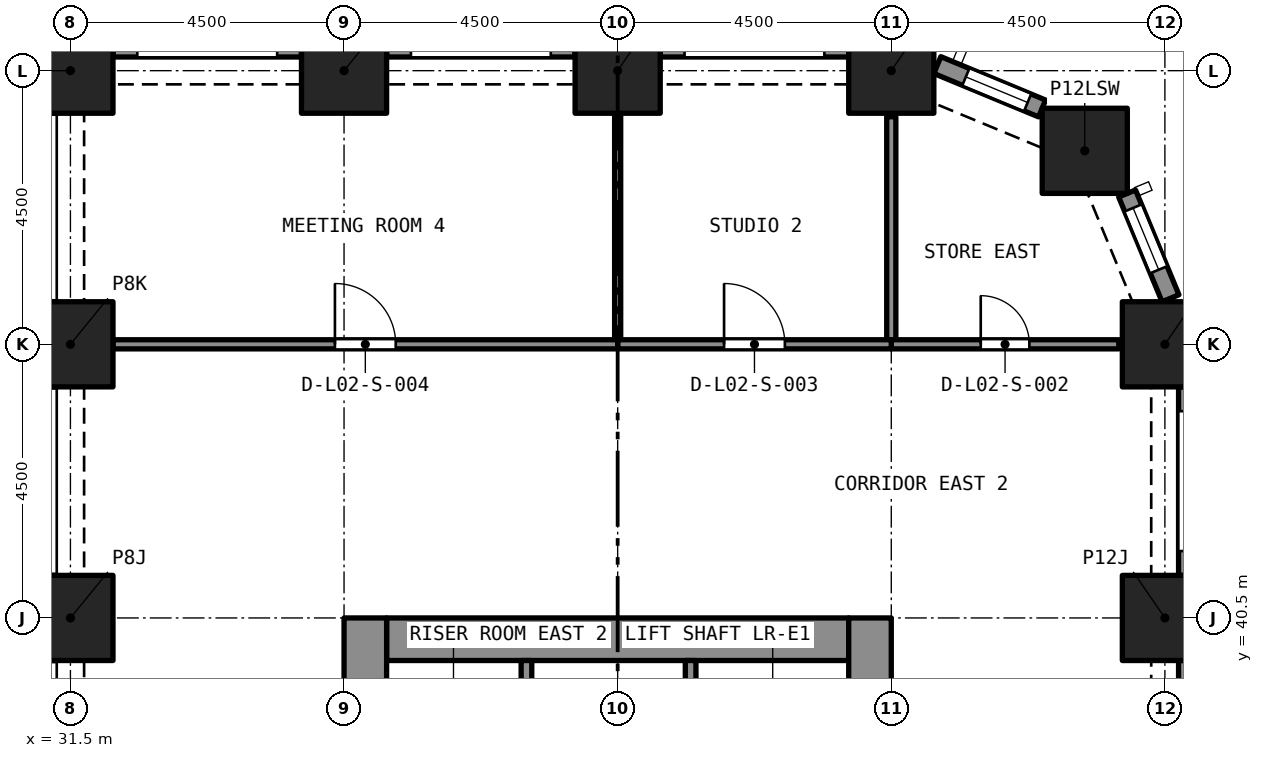
"""IFC4 building model, lengths in metres.
Left out: names, types, materials, properties, quantities, classifications, styles, units other than length and angle.
Written with IfcOpenShell. Run it as: python <this file> out.ifc"""

import sys

from ifc_helpers import new_model, si_unit, direction, frame, frame_2d, origin, origin_2d, place, context, subcontext, project, spatial, rectangle, extrude, element, fill, save


model = new_model("IFC4")
c1 = context("Model", 3, precision=1e-05, world=origin(), true_north=direction((0.0, 1.0)))
c2 = subcontext(c1, "Body", "Model", "MODEL_VIEW")
j1 = project(units=[si_unit("LENGTHUNIT", "METRE"), si_unit("PLANEANGLEUNIT", "RADIAN")], contexts=[c1])
p1 = place(None, origin())
s1 = spatial("IfcSite", under=j1, at=p1, CompositionType="ELEMENT")
p2 = place(p1, origin())
s2 = spatial("IfcBuilding", under=s1, at=p2, CompositionType="ELEMENT")
p3 = place(p2, frame((0.0, 0.0, 11.0)))
s3 = spatial("IfcBuildingStorey", under=s2, at=p3, CompositionType="ELEMENT", Elevation=11.0)
for number, where, z_axis, x_axis in (
    (1, (31.5, 40.5, 0.0), (0.0, 0.0, 1.0), (1.0, 0.0, 0.0)),
    (2, (49.5, 40.5, 0.0), (0.0, 0.0, 1.0), (1.0, 0.0, 0.0)),
    (3, (31.5, 45.0, 0.0), (0.0, 0.0, 1.0), (1.0, 0.0, 0.0)),
    (4, (49.5, 45.0, 0.0), (0.0, 0.0, 1.0), (1.0, 0.0, 0.0)),
    (5, (48.182, 48.182, 0.0), (0.0, 0.0, 1.0), (1.0, 0.0, 0.0)),
    (6, (31.5, 49.5, 0.0), (0.0, 0.0, 1.0), (1.0, 0.0, 0.0)),
    (7, (36.0, 49.5, 0.0), (0.0, 0.0, 1.0), (1.0, 0.0, 0.0)),
    (8, (40.5, 49.5, 0.0), (0.0, 0.0, 1.0), (1.0, 0.0, 0.0)),
    (9, (45.0, 49.5, 0.0), (0.0, 0.0, 1.0), (1.0, 0.0, 0.0)),
):
    element("IfcColumn", number, at=place(p3, frame(where, z_axis=z_axis, x_axis=x_axis)), inside=s3, PredefinedType="COLUMN", context=c2, shape_type="SweptSolid", body=[
        extrude(rectangle(XDim=1.4, YDim=1.4, at=origin_2d()), origin(), (0.0, 0.0, 1.0), 5.0),
    ])
p4 = place(p3, frame((36.7, 40.15, 0.0), z_axis=(0.0, 0.0, 1.0), x_axis=(1.0, 0.0, 0.0)))
e10 = element("IfcWall", 10, at=p4, inside=s3, PredefinedType="SOLIDWALL", context=c2, shape_type="SweptSolid", body=[
    extrude(rectangle(XDim=7.6, YDim=0.7, at=frame_2d((3.8, 0.0))), origin(), (0.0, 0.0, 1.0), 5.0),
])
p5 = place(p3, frame((36.35, 27.0, 0.0), z_axis=(0.0, 0.0, 1.0), x_axis=(0.0, 1.0, 0.0)))
e11 = element("IfcWall", 11, at=p5, inside=s3, PredefinedType="SOLIDWALL", context=c2, shape_type="SweptSolid", body=[
    extrude(rectangle(XDim=13.5, YDim=0.7, at=frame_2d((6.75, 0.0))), origin(), (0.0, 0.0, 1.0), 5.0),
])
p6 = place(p5, frame((8.95, 0.0, 0.0)))
e12 = element("IfcOpeningElement", 12, at=p6, cuts=e11, PredefinedType="OPENING", context=c2, shape_type="SweptSolid", body=[
    extrude(rectangle(XDim=1.2, YDim=2.1, at=frame_2d((0.6, 1.05))), frame((0.0, 0.36, 0.0), z_axis=(0.0, -1.0, 0.0), x_axis=(1.0, 0.0, 0.0)), (0.0, 0.0, 1.0), 0.72),
])
p7 = place(p3, frame((44.65, 27.0, 0.0), z_axis=(0.0, 0.0, 1.0), x_axis=(0.0, 1.0, 0.0)))
e13 = element("IfcWall", 13, at=p7, inside=s3, PredefinedType="SOLIDWALL", context=c2, shape_type="SweptSolid", body=[
    extrude(rectangle(XDim=13.5, YDim=0.7, at=frame_2d((6.75, 0.0))), origin(), (0.0, 0.0, 1.0), 5.0),
])
p8 = place(p7, frame((8.95, 0.0, 0.0)))
e14 = element("IfcOpeningElement", 14, at=p8, cuts=e13, PredefinedType="OPENING", context=c2, shape_type="SweptSolid", body=[
    extrude(rectangle(XDim=1.2, YDim=2.1, at=frame_2d((0.6, 1.05))), frame((0.0, 0.36, 0.0), z_axis=(0.0, -1.0, 0.0), x_axis=(1.0, 0.0, 0.0)), (0.0, 0.0, 1.0), 0.72),
])
p9 = place(p3, frame((49.875, 39.8, 0.0), z_axis=(0.0, 0.0, 1.0), x_axis=(0.0, -1.0, 0.0)))
e15 = element("IfcWall", 15, at=p9, inside=s3, PredefinedType="SOLIDWALL", context=c2, shape_type="SweptSolid", body=[
    extrude(rectangle(XDim=3.1, YDim=0.3, at=frame_2d((1.55, 0.0))), origin(), (0.0, 0.0, 1.0), 5.0),
])
p10 = place(p9, frame((0.4, 0.0, 0.45)))
e16 = element("IfcOpeningElement", 16, at=p10, cuts=e15, PredefinedType="OPENING", context=c2, shape_type="SweptSolid", body=[
    extrude(rectangle(XDim=2.3, YDim=3.3, at=frame_2d((1.15, 1.65))), frame((0.0, 0.16, 0.0), z_axis=(0.0, -1.0, 0.0), x_axis=(1.0, 0.0, 0.0)), (0.0, 0.0, 1.0), 0.32),
])
p11 = place(p3, frame((49.875, 44.3, 0.0), z_axis=(0.0, 0.0, 1.0), x_axis=(0.0, -1.0, 0.0)))
e17 = element("IfcWall", 17, at=p11, inside=s3, PredefinedType="SOLIDWALL", context=c2, shape_type="SweptSolid", body=[
    extrude(rectangle(XDim=3.1, YDim=0.3, at=frame_2d((1.55, 0.0))), origin(), (0.0, 0.0, 1.0), 5.0),
])
p12 = place(p11, frame((0.4, 0.0, 0.45)))
e18 = element("IfcOpeningElement", 18, at=p12, cuts=e17, PredefinedType="OPENING", context=c2, shape_type="SweptSolid", body=[
    extrude(rectangle(XDim=2.3, YDim=3.3, at=frame_2d((1.15, 1.65))), frame((0.0, 0.16, 0.0), z_axis=(0.0, -1.0, 0.0), x_axis=(1.0, 0.0, 0.0)), (0.0, 0.0, 1.0), 0.32),
])
p13 = place(p3, frame((48.878, 47.48, 0.0), z_axis=(0.0, 0.0, 1.0), x_axis=(0.38262540684, -0.923903565336, 0.0)))
e19 = element("IfcWall", 19, at=p13, inside=s3, PredefinedType="SOLIDWALL", context=c2, shape_type="SweptSolid", body=[
    extrude(rectangle(XDim=1.865, YDim=0.3, at=frame_2d((0.933, 0.0))), origin(), (0.0, 0.0, 1.0), 5.0),
])
p14 = place(p13, frame((0.258, 0.0, 0.45)))
e20 = element("IfcOpeningElement", 20, at=p14, cuts=e19, PredefinedType="OPENING", context=c2, shape_type="SweptSolid", body=[
    extrude(rectangle(XDim=1.1, YDim=3.3, at=frame_2d((0.55, 1.65))), frame((0.0, 0.16, 0.0), z_axis=(0.0, -1.0, 0.0), x_axis=(1.0, 0.0, 0.0)), (0.0, 0.0, 1.0), 0.32),
])
p15 = place(p3, frame((45.757, 49.592, 0.0), z_axis=(0.0, 0.0, 1.0), x_axis=(0.923857286003, -0.382737135771, 0.0)))
e21 = element("IfcWall", 21, at=p15, inside=s3, PredefinedType="SOLIDWALL", context=c2, shape_type="SweptSolid", body=[
    extrude(rectangle(XDim=1.865, YDim=0.3, at=frame_2d((0.933, 0.0))), origin(), (0.0, 0.0, 1.0), 5.0),
])
p16 = place(p15, frame((0.508, 0.0, 0.45)))
e22 = element("IfcOpeningElement", 22, at=p16, cuts=e21, PredefinedType="OPENING", context=c2, shape_type="SweptSolid", body=[
    extrude(rectangle(XDim=1.1, YDim=3.3, at=frame_2d((0.55, 1.65))), frame((0.0, 0.16, 0.0), z_axis=(0.0, -1.0, 0.0), x_axis=(1.0, 0.0, 0.0)), (0.0, 0.0, 1.0), 0.32),
])
p17 = place(p3, frame((41.2, 49.875, 0.0), z_axis=(0.0, 0.0, 1.0), x_axis=(1.0, 0.0, 0.0)))
e23 = element("IfcWall", 23, at=p17, inside=s3, PredefinedType="SOLIDWALL", context=c2, shape_type="SweptSolid", body=[
    extrude(rectangle(XDim=3.1, YDim=0.3, at=frame_2d((1.55, 0.0))), origin(), (0.0, 0.0, 1.0), 5.0),
])
p18 = place(p17, frame((0.4, 0.0, 0.45)))
e24 = element("IfcOpeningElement", 24, at=p18, cuts=e23, PredefinedType="OPENING", context=c2, shape_type="SweptSolid", body=[
    extrude(rectangle(XDim=2.3, YDim=3.3, at=frame_2d((1.15, 1.65))), frame((0.0, 0.16, 0.0), z_axis=(0.0, -1.0, 0.0), x_axis=(1.0, 0.0, 0.0)), (0.0, 0.0, 1.0), 0.32),
])
p19 = place(p3, frame((36.7, 49.875, 0.0), z_axis=(0.0, 0.0, 1.0), x_axis=(1.0, 0.0, 0.0)))
e25 = element("IfcWall", 25, at=p19, inside=s3, PredefinedType="SOLIDWALL", context=c2, shape_type="SweptSolid", body=[
    extrude(rectangle(XDim=3.1, YDim=0.3, at=frame_2d((1.55, 0.0))), origin(), (0.0, 0.0, 1.0), 5.0),
])
p20 = place(p19, frame((0.4, 0.0, 0.45)))
e26 = element("IfcOpeningElement", 26, at=p20, cuts=e25, PredefinedType="OPENING", context=c2, shape_type="SweptSolid", body=[
    extrude(rectangle(XDim=2.3, YDim=3.3, at=frame_2d((1.15, 1.65))), frame((0.0, 0.16, 0.0), z_axis=(0.0, -1.0, 0.0), x_axis=(1.0, 0.0, 0.0)), (0.0, 0.0, 1.0), 0.32),
])
p21 = place(p3, frame((32.2, 49.875, 0.0), z_axis=(0.0, 0.0, 1.0), x_axis=(1.0, 0.0, 0.0)))
e27 = element("IfcWall", 27, at=p21, inside=s3, PredefinedType="SOLIDWALL", context=c2, shape_type="SweptSolid", body=[
    extrude(rectangle(XDim=3.1, YDim=0.3, at=frame_2d((1.55, 0.0))), origin(), (0.0, 0.0, 1.0), 5.0),
])
p22 = place(p21, frame((0.4, 0.0, 0.45)))
e28 = element("IfcOpeningElement", 28, at=p22, cuts=e27, PredefinedType="OPENING", context=c2, shape_type="SweptSolid", body=[
    extrude(rectangle(XDim=2.3, YDim=3.3, at=frame_2d((1.15, 1.65))), frame((0.0, 0.16, 0.0), z_axis=(0.0, -1.0, 0.0), x_axis=(1.0, 0.0, 0.0)), (0.0, 0.0, 1.0), 0.32),
])
for number, where, z_axis, x_axis in (
    (29, (41.7, 37.5, 0.0), (0.0, 0.0, 1.0), (0.0, 1.0, 0.0)),
    (30, (39.0, 37.5, 0.0), (0.0, 0.0, 1.0), (0.0, 1.0, 0.0)),
):
    element("IfcWall", number, at=place(p3, frame(where, z_axis=z_axis, x_axis=x_axis)), inside=s3, PredefinedType="SOLIDWALL", context=c2, shape_type="SweptSolid", body=[
        extrude(rectangle(XDim=2.3, YDim=0.175, at=frame_2d((1.15, 0.0))), origin(), (0.0, 0.0, 1.0), 4.65),
    ])
p23 = place(p3, frame((45.0, 45.075, 0.0), z_axis=(0.0, 0.0, 1.0), x_axis=(0.0, 1.0, 0.0)))
e31 = element("IfcWall", 31, at=p23, inside=s3, PredefinedType="PARTITIONING", context=c2, shape_type="SweptSolid", body=[
    extrude(rectangle(XDim=3.667, YDim=0.15, at=frame_2d((1.834, 0.0))), origin(), (0.0, 0.0, 1.0), 4.65),
])
p24 = place(p3, frame((45.0, 45.0, 0.0), z_axis=(0.0, 0.0, 1.0), x_axis=(1.0, 0.0, 0.0)))
e32 = element("IfcWall", 32, at=p24, inside=s3, PredefinedType="PARTITIONING", context=c2, shape_type="SweptSolid", body=[
    extrude(rectangle(XDim=3.742, YDim=0.15, at=frame_2d((1.871, 0.0))), origin(), (0.0, 0.0, 1.0), 4.65),
])
p25 = place(p24, frame((1.471, 0.0, 0.0)))
e33 = element("IfcOpeningElement", 33, at=p25, cuts=e32, PredefinedType="OPENING", context=c2, shape_type="SweptSolid", body=[
    extrude(rectangle(XDim=0.8, YDim=2.1, at=frame_2d((0.4, 1.05))), frame((0.0, 0.085, 0.0), z_axis=(0.0, -1.0, 0.0), x_axis=(1.0, 0.0, 0.0)), (0.0, 0.0, 1.0), 0.17),
])
p26 = place(p3, frame((40.5, 45.075, 0.0), z_axis=(0.0, 0.0, 1.0), x_axis=(0.0, 1.0, 0.0)))
e34 = element("IfcWall", 34, at=p26, inside=s3, PredefinedType="PARTITIONING", context=c2, shape_type="SweptSolid", body=[
    extrude(rectangle(XDim=3.725, YDim=0.1, at=frame_2d((1.863, 0.0))), origin(), (0.0, 0.0, 1.0), 4.65),
])
p27 = place(p3, frame((40.5, 45.0, 0.0), z_axis=(0.0, 0.0, 1.0), x_axis=(1.0, 0.0, 0.0)))
e35 = element("IfcWall", 35, at=p27, inside=s3, PredefinedType="PARTITIONING", context=c2, shape_type="SweptSolid", body=[
    extrude(rectangle(XDim=4.5, YDim=0.15, at=frame_2d((2.25, 0.0))), origin(), (0.0, 0.0, 1.0), 4.65),
])
p28 = place(p27, frame((1.75, 0.0, 0.0)))
e36 = element("IfcOpeningElement", 36, at=p28, cuts=e35, PredefinedType="OPENING", context=c2, shape_type="SweptSolid", body=[
    extrude(rectangle(XDim=1.0, YDim=2.1, at=frame_2d((0.5, 1.05))), frame((0.0, 0.085, 0.0), z_axis=(0.0, -1.0, 0.0), x_axis=(1.0, 0.0, 0.0)), (0.0, 0.0, 1.0), 0.17),
])
p29 = place(p3, frame((32.2, 45.0, 0.0), z_axis=(0.0, 0.0, 1.0), x_axis=(1.0, 0.0, 0.0)))
e37 = element("IfcWall", 37, at=p29, inside=s3, PredefinedType="PARTITIONING", context=c2, shape_type="SweptSolid", body=[
    extrude(rectangle(XDim=8.3, YDim=0.15, at=frame_2d((4.15, 0.0))), origin(), (0.0, 0.0, 1.0), 4.65),
])
p30 = place(p29, frame((3.65, 0.0, 0.0)))
e38 = element("IfcOpeningElement", 38, at=p30, cuts=e37, PredefinedType="OPENING", context=c2, shape_type="SweptSolid", body=[
    extrude(rectangle(XDim=1.0, YDim=2.1, at=frame_2d((0.5, 1.05))), frame((0.0, 0.085, 0.0), z_axis=(0.0, -1.0, 0.0), x_axis=(1.0, 0.0, 0.0)), (0.0, 0.0, 1.0), 0.17),
])
p31 = place(p14, origin())
e39 = element("IfcWindow", 39, at=p31, inside=s3, PartitioningType="SINGLE_PANEL", PredefinedType="WINDOW", context=c2, shape_type="SweptSolid", body=[
    extrude(rectangle(XDim=1.1, YDim=3.3, at=frame_2d((0.55, 1.65))), frame((0.0, 0.03, 0.0), z_axis=(0.0, -1.0, 0.0), x_axis=(1.0, 0.0, 0.0)), (0.0, 0.0, 1.0), 0.06),
])
fill(e20, e39)
p32 = place(p16, origin())
e40 = element("IfcWindow", 40, at=p32, inside=s3, PartitioningType="SINGLE_PANEL", PredefinedType="WINDOW", context=c2, shape_type="SweptSolid", body=[
    extrude(rectangle(XDim=1.1, YDim=3.3, at=frame_2d((0.55, 1.65))), frame((0.0, 0.03, 0.0), z_axis=(0.0, -1.0, 0.0), x_axis=(1.0, 0.0, 0.0)), (0.0, 0.0, 1.0), 0.06),
])
fill(e22, e40)
p33 = place(p25, origin())
e41 = element("IfcDoor", 41, at=p33, inside=s3, OperationType="SINGLE_SWING_RIGHT", PredefinedType="DOOR", context=c2, shape_type="SweptSolid", body=[
    extrude(rectangle(XDim=0.8, YDim=2.1, at=frame_2d((0.4, 1.05))), frame((0.0, 0.025, 0.0), z_axis=(0.0, -1.0, 0.0), x_axis=(1.0, 0.0, 0.0)), (0.0, 0.0, 1.0), 0.05),
])
fill(e33, e41)
p34 = place(p28, origin())
e42 = element("IfcDoor", 42, at=p34, inside=s3, OperationType="SINGLE_SWING_RIGHT", PredefinedType="DOOR", context=c2, shape_type="SweptSolid", body=[
    extrude(rectangle(XDim=1.0, YDim=2.1, at=frame_2d((0.5, 1.05))), frame((0.0, 0.025, 0.0), z_axis=(0.0, -1.0, 0.0), x_axis=(1.0, 0.0, 0.0)), (0.0, 0.0, 1.0), 0.05),
])
fill(e36, e42)
p35 = place(p30, origin())
e43 = element("IfcDoor", 43, at=p35, inside=s3, OperationType="SINGLE_SWING_RIGHT", PredefinedType="DOOR", context=c2, shape_type="SweptSolid", body=[
    extrude(rectangle(XDim=1.0, YDim=2.1, at=frame_2d((0.5, 1.05))), frame((0.0, 0.025, 0.0), z_axis=(0.0, -1.0, 0.0), x_axis=(1.0, 0.0, 0.0)), (0.0, 0.0, 1.0), 0.05),
])
fill(e38, e43)
save(model, sys.argv[1])
